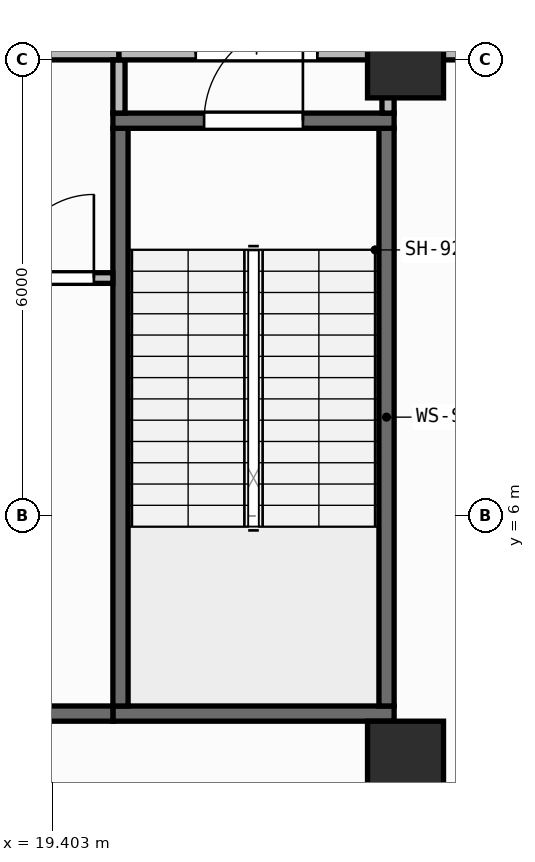
"""IFC4 building model, lengths in metres.
Left out: names, types, materials, properties, quantities, classifications, styles, units other than length and angle.
Written with IfcOpenShell. Run it as: python <this file> out.ifc"""

import sys

from ifc_helpers import new_model, si_unit, direction, frame, frame_2d, origin, origin_2d, place, context, subcontext, project, spatial, rectangle, extrude, element, fill, save


model = new_model("IFC4")
c1 = context("Model", 3, precision=1e-05, world=origin(), true_north=direction((0.0, 1.0)))
c2 = subcontext(c1, "Body", "Model", "MODEL_VIEW")
j1 = project(units=[si_unit("LENGTHUNIT", "METRE"), si_unit("PLANEANGLEUNIT", "RADIAN")], contexts=[c1])
p1 = place(None, origin())
s1 = spatial("IfcSite", under=j1, at=p1, CompositionType="ELEMENT")
p2 = place(p1, origin())
s2 = spatial("IfcBuilding", under=s1, at=p2, CompositionType="ELEMENT")
p3 = place(p2, frame((0.0, 0.0, 235.55)))
s3 = spatial("IfcBuildingStorey", under=s2, at=p3, CompositionType="ELEMENT", Elevation=235.55)
for number, where, z_axis, x_axis in (
    (1, (24.05, 2.8, 0.0), (0.0, 0.0, 1.0), (1.0, 0.0, 0.0)),
    (2, (24.05, 12.0, 0.0), (0.0, 0.0, 1.0), (1.0, 0.0, 0.0)),
):
    element("IfcColumn", number, at=place(p3, frame(where, z_axis=z_axis, x_axis=x_axis)), inside=s3, PredefinedType="COLUMN", context=c2, shape_type="SweptSolid", body=[
        extrude(rectangle(XDim=1.0, YDim=1.0, at=origin_2d()), origin(), (0.0, 0.0, 1.0), 5.2),
    ])
p4 = place(p3, frame((2.66, 0.174, 0.0), z_axis=(0.0, 0.0, 1.0), x_axis=(0.996611813627, 0.082248969229, 0.0)))
e3 = element("IfcWall", 3, at=p4, inside=s3, PredefinedType="STANDARD", context=c2, shape_type="SweptSolid", body=[
    extrude(rectangle(XDim=41.019, YDim=0.26, at=frame_2d((20.51, 0.0))), origin(), (0.0, 0.0, 1.0), 4.96),
])
p5 = place(p3, frame((20.2, 3.4, 0.0), z_axis=(0.0, 0.0, 1.0), x_axis=(1.0, 0.0, 0.0)))
e4 = element("IfcWall", 4, at=p5, inside=s3, PredefinedType="SHEAR", context=c2, shape_type="SweptSolid", body=[
    extrude(rectangle(XDim=3.7, YDim=0.2, at=frame_2d((1.85, 0.0))), origin(), (0.0, 0.0, 1.0), 4.96),
])
for number, where, z_axis, x_axis in (
    (5, (20.3, 3.5, 0.0), (0.0, 0.0, 1.0), (0.0, 1.0, 0.0)),
    (6, (23.8, 3.5, 0.0), (0.0, 0.0, 1.0), (0.0, 1.0, 0.0)),
):
    element("IfcWall", number, at=place(p3, frame(where, z_axis=z_axis, x_axis=x_axis)), inside=s3, PredefinedType="SHEAR", context=c2, shape_type="SweptSolid", body=[
        extrude(rectangle(XDim=7.6, YDim=0.2, at=frame_2d((3.8, 0.0))), origin(), (0.0, 0.0, 1.0), 4.96),
    ])
p6 = place(p3, frame((20.2, 11.2, 0.0), z_axis=(0.0, 0.0, 1.0), x_axis=(1.0, 0.0, 0.0)))
e7 = element("IfcWall", 7, at=p6, inside=s3, PredefinedType="SHEAR", context=c2, shape_type="SweptSolid", body=[
    extrude(rectangle(XDim=3.7, YDim=0.2, at=frame_2d((1.85, 0.0))), origin(), (0.0, 0.0, 1.0), 4.96),
])
p7 = place(p6, frame((1.2, 0.0, 0.0)))
e8 = element("IfcOpeningElement", 8, at=p7, cuts=e7, PredefinedType="OPENING", context=c2, shape_type="SweptSolid", body=[
    extrude(rectangle(XDim=1.3, YDim=2.15, at=frame_2d((0.65, 1.075))), frame((0.0, 0.11, 0.0), z_axis=(0.0, -1.0, 0.0), x_axis=(1.0, 0.0, 0.0)), (0.0, 0.0, 1.0), 0.22),
])
p8 = place(p3, frame((6.5, 3.4, 0.0), z_axis=(0.0, 0.0, 1.0), x_axis=(1.0, 0.0, 0.0)))
e9 = element("IfcWall", 9, at=p8, inside=s3, PredefinedType="SHEAR", context=c2, shape_type="SweptSolid", body=[
    extrude(rectangle(XDim=13.7, YDim=0.2, at=frame_2d((6.85, 0.0))), origin(), (0.0, 0.0, 1.0), 4.96),
])
p9 = place(p3, frame((18.61, 9.13, 0.0), z_axis=(0.0, 0.0, 1.0), x_axis=(1.0, 0.0, 0.0)))
e10 = element("IfcWall", 10, at=p9, inside=s3, PredefinedType="PARTITIONING", context=c2, shape_type="SweptSolid", body=[
    extrude(rectangle(XDim=1.59, YDim=0.14, at=frame_2d((0.795, 0.0))), origin(), (0.0, 0.0, 1.0), 4.96),
])
p10 = place(p9, frame((0.24, 0.0, 0.0)))
e11 = element("IfcOpeningElement", 11, at=p10, cuts=e10, PredefinedType="OPENING", context=c2, shape_type="SweptSolid", body=[
    extrude(rectangle(XDim=1.1, YDim=2.1, at=frame_2d((0.55, 1.05))), frame((0.0, 0.08, 0.0), z_axis=(0.0, -1.0, 0.0), x_axis=(1.0, 0.0, 0.0)), (0.0, 0.0, 1.0), 0.16),
])
p11 = place(p3, frame((12.58, 12.08, 0.0), z_axis=(0.0, 0.0, 1.0), x_axis=(1.0, 0.0, 0.0)))
e12 = element("IfcWall", 12, at=p11, inside=s3, PredefinedType="PARTITIONING", context=c2, shape_type="SweptSolid", body=[
    extrude(rectangle(XDim=7.7, YDim=0.16, at=frame_2d((3.85, 0.0))), origin(), (0.0, 0.0, 1.0), 4.235),
])
p12 = place(p11, frame((3.05, 0.0, 0.0)))
e13 = element("IfcOpeningElement", 13, at=p12, cuts=e12, PredefinedType="OPENING", context=c2, shape_type="SweptSolid", body=[
    extrude(rectangle(XDim=1.6, YDim=2.05, at=frame_2d((0.8, 1.025))), frame((0.0, 0.09, 0.0), z_axis=(0.0, -1.0, 0.0), x_axis=(1.0, 0.0, 0.0)), (0.0, 0.0, 1.0), 0.18),
])
p13 = place(p3, frame((20.28, 11.3, 0.0), z_axis=(0.0, 0.0, 1.0), x_axis=(0.0, 1.0, 0.0)))
e14 = element("IfcWall", 14, at=p13, inside=s3, PredefinedType="PARTITIONING", context=c2, shape_type="SweptSolid", body=[
    extrude(rectangle(XDim=0.7, YDim=0.16, at=frame_2d((0.35, 0.0))), origin(), (0.0, 0.0, 1.0), 4.96),
])
p14 = place(p3, frame((20.28, 12.08, 0.0), z_axis=(0.0, 0.0, 1.0), x_axis=(1.0, 0.0, 0.0)))
e15 = element("IfcWall", 15, at=p14, inside=s3, PredefinedType="PARTITIONING", context=c2, shape_type="SweptSolid", body=[
    extrude(rectangle(XDim=3.62, YDim=0.16, at=frame_2d((1.81, 0.0))), origin(), (0.0, 0.0, 1.0), 4.235),
])
p15 = place(p14, frame((1.01, 0.0, 0.0)))
e16 = element("IfcOpeningElement", 16, at=p15, cuts=e15, PredefinedType="OPENING", context=c2, shape_type="SweptSolid", body=[
    extrude(rectangle(XDim=1.6, YDim=2.05, at=frame_2d((0.8, 1.025))), frame((0.0, 0.09, 0.0), z_axis=(0.0, -1.0, 0.0), x_axis=(1.0, 0.0, 0.0)), (0.0, 0.0, 1.0), 0.18),
])
p16 = place(p3, frame((23.82, 11.3, 0.0), z_axis=(0.0, 0.0, 1.0), x_axis=(0.0, 1.0, 0.0)))
e17 = element("IfcWall", 17, at=p16, inside=s3, PredefinedType="PARTITIONING", context=c2, shape_type="SweptSolid", body=[
    extrude(rectangle(XDim=0.7, YDim=0.16, at=frame_2d((0.35, 0.0))), origin(), (0.0, 0.0, 1.0), 4.96),
])
p17 = place(p3, frame((23.92, 12.08, 0.0), z_axis=(0.0, 0.0, 1.0), x_axis=(1.0, 0.0, 0.0)))
e18 = element("IfcWall", 18, at=p17, inside=s3, PredefinedType="PARTITIONING", context=c2, shape_type="SweptSolid", body=[
    extrude(rectangle(XDim=19.36, YDim=0.16, at=frame_2d((9.68, 0.0))), origin(), (0.0, 0.0, 1.0), 4.235),
])
p18 = place(p7, origin())
e19 = element("IfcDoor", 19, at=p18, inside=s3, OperationType="SINGLE_SWING_RIGHT", PredefinedType="DOOR", context=c2, shape_type="SweptSolid", body=[
    extrude(rectangle(XDim=1.3, YDim=2.15, at=frame_2d((0.65, 1.075))), frame((0.0, 0.025, 0.0), z_axis=(0.0, -1.0, 0.0), x_axis=(1.0, 0.0, 0.0)), (0.0, 0.0, 1.0), 0.05),
])
fill(e8, e19)
p19 = place(p10, origin())
e20 = element("IfcDoor", 20, at=p19, inside=s3, OperationType="SINGLE_SWING_RIGHT", PredefinedType="DOOR", context=c2, shape_type="SweptSolid", body=[
    extrude(rectangle(XDim=1.1, YDim=2.1, at=frame_2d((0.55, 1.05))), frame((0.0, 0.025, 0.0), z_axis=(0.0, -1.0, 0.0), x_axis=(1.0, 0.0, 0.0)), (0.0, 0.0, 1.0), 0.05),
])
fill(e11, e20)
p20 = place(p15, origin())
e21 = element("IfcDoor", 21, at=p20, inside=s3, OperationType="DOUBLE_DOOR_SINGLE_SWING", PredefinedType="DOOR", context=c2, shape_type="SweptSolid", body=[
    extrude(rectangle(XDim=1.6, YDim=2.05, at=frame_2d((0.8, 1.025))), frame((0.0, 0.025, 0.0), z_axis=(0.0, -1.0, 0.0), x_axis=(1.0, 0.0, 0.0)), (0.0, 0.0, 1.0), 0.05),
])
fill(e16, e21)
save(model, sys.argv[1])
